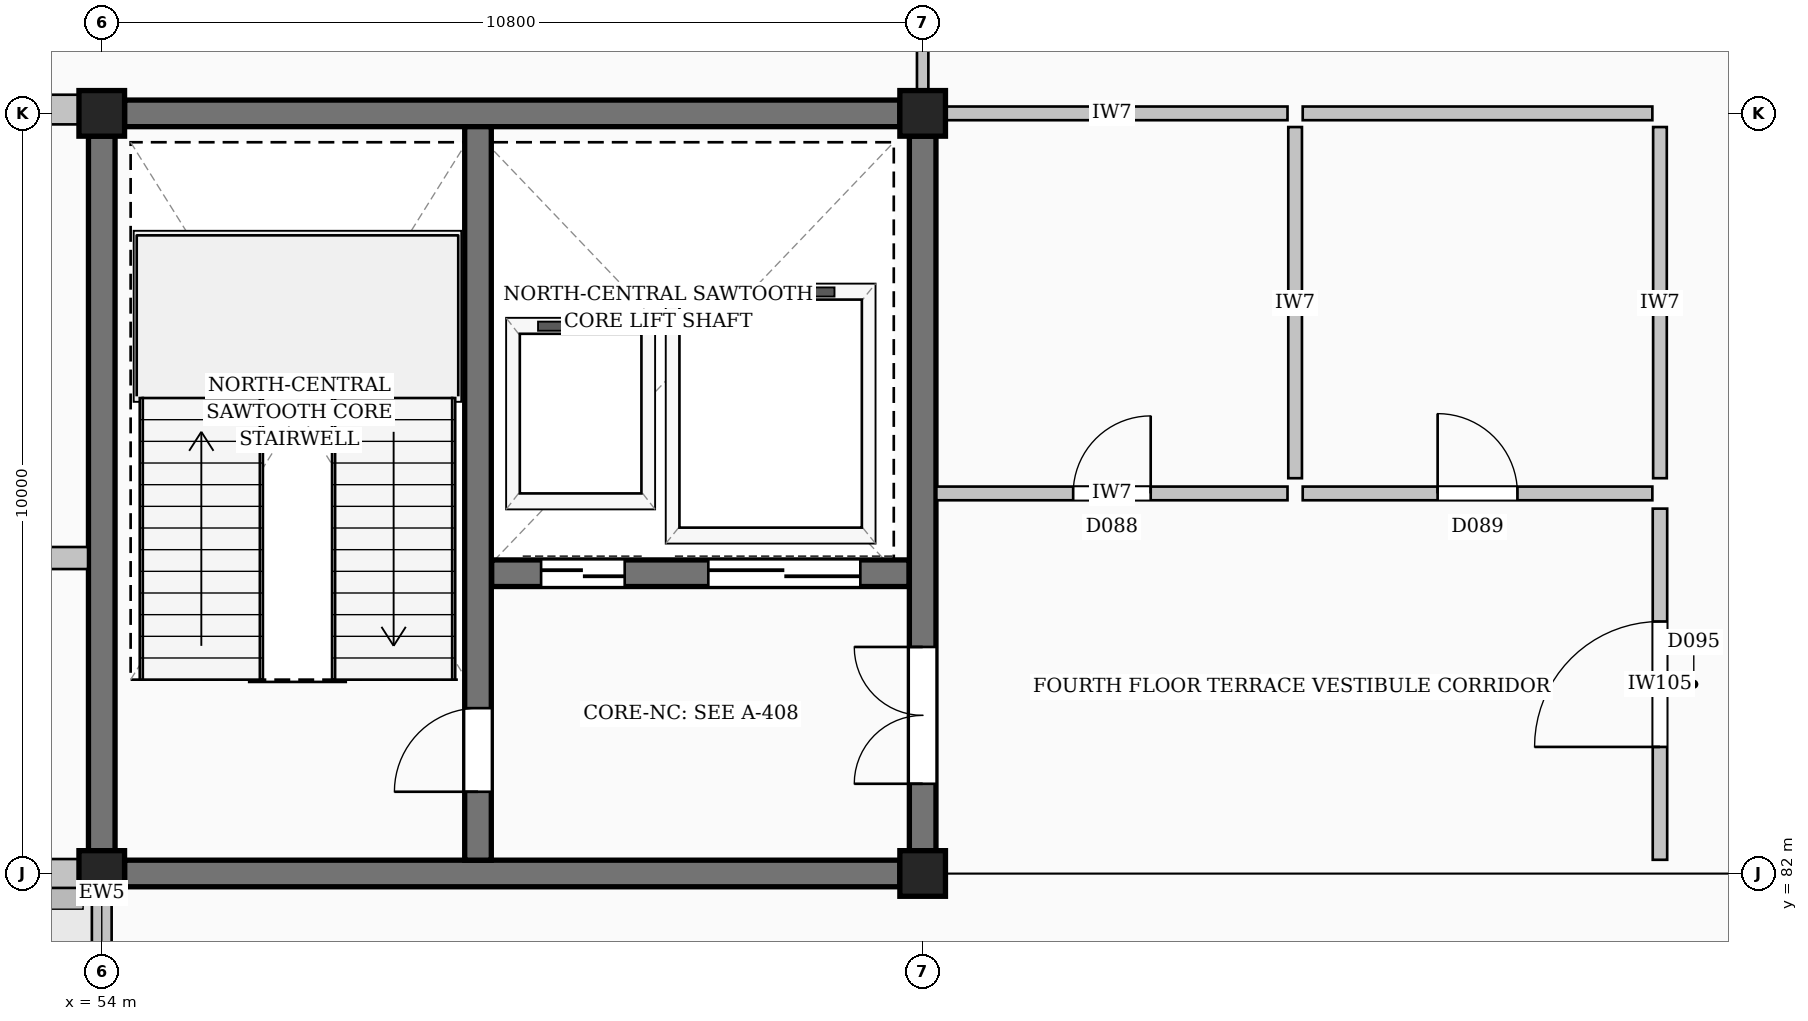
"""IFC4 building model, lengths in metres.
Left out: names, types, materials, properties, quantities, classifications, styles, units other than length and angle.
Written with IfcOpenShell. Run it as: python <this file> out.ifc"""

import sys

from ifc_helpers import new_model, si_unit, direction, frame, frame_2d, origin, origin_2d, place, context, subcontext, project, spatial, rectangle, extrude, element, fill, save


model = new_model("IFC4")
c1 = context("Model", 3, precision=1e-05, world=origin(), true_north=direction((0.0, 1.0)))
c2 = subcontext(c1, "Body", "Model", "MODEL_VIEW")
j1 = project(units=[si_unit("LENGTHUNIT", "METRE"), si_unit("PLANEANGLEUNIT", "RADIAN")], contexts=[c1])
p1 = place(None, origin())
s1 = spatial("IfcSite", under=j1, at=p1, CompositionType="ELEMENT")
p2 = place(p1, origin())
s2 = spatial("IfcBuilding", under=s1, at=p2, CompositionType="ELEMENT")
p3 = place(p2, frame((0.0, 0.0, 24.0)))
s3 = spatial("IfcBuildingStorey", under=s2, at=p3, CompositionType="ELEMENT", Elevation=24.0)
for number, where, z_axis, x_axis in (
    (1, (54.0, 82.0, 0.0), (0.0, 0.0, 1.0), (1.0, 0.0, 0.0)),
    (2, (54.0, 92.0, 0.0), (0.0, 0.0, 1.0), (1.0, 0.0, 0.0)),
    (3, (64.8, 82.0, 0.0), (0.0, 0.0, 1.0), (1.0, 0.0, 0.0)),
    (4, (64.8, 92.0, 0.0), (0.0, 0.0, 1.0), (1.0, 0.0, 0.0)),
):
    element("IfcColumn", number, at=place(p3, frame(where, z_axis=z_axis, x_axis=x_axis)), inside=s3, PredefinedType="COLUMN", context=c2, shape_type="SweptSolid", body=[
        extrude(rectangle(XDim=0.6, YDim=0.6, at=origin_2d()), origin(), (0.0, 0.0, 1.0), 4.8),
    ])
p4 = place(p3, frame((43.345, 82.0, 0.0), z_axis=(0.0, 0.0, 1.0), x_axis=(1.0, 0.0, 0.0)))
e5 = element("IfcWall", 5, at=p4, inside=s3, PredefinedType="STANDARD", context=c2, shape_type="SweptSolid", body=[
    extrude(rectangle(XDim=10.51, YDim=0.38, at=frame_2d((5.255, 0.0))), origin(), (0.0, 0.0, 1.0), 4.17),
])
p5 = place(p4, frame((3.655, 0.0, 1.0)))
e6 = element("IfcOpeningElement", 6, at=p5, cuts=e5, PredefinedType="OPENING", context=c2, shape_type="SweptSolid", body=[
    extrude(rectangle(XDim=3.2, YDim=2.5, at=frame_2d((1.6, 1.25))), frame((0.0, 0.2, 0.0), z_axis=(0.0, -1.0, 0.0), x_axis=(1.0, 0.0, 0.0)), (0.0, 0.0, 1.0), 0.4),
])
p6 = place(p3, frame((54.0, 81.855, 0.0), z_axis=(0.0, 0.0, 1.0), x_axis=(0.0, -1.0, 0.0)))
e7 = element("IfcWall", 7, at=p6, inside=s3, PredefinedType="STANDARD", context=c2, shape_type="SweptSolid", body=[
    extrude(rectangle(XDim=0.225, YDim=0.3, at=frame_2d((0.113, 0.0))), origin(), (0.0, 0.0, 1.0), 4.56),
])
p7 = place(p3, frame((54.0, 40.35, 4.6), z_axis=(0.0, 0.0, 1.0), x_axis=(0.0, 1.0, 0.0)))
e8 = element("IfcWall", 8, at=p7, inside=s3, PredefinedType="PARAPET", context=c2, shape_type="SweptSolid", body=[
    extrude(rectangle(XDim=41.3, YDim=0.26, at=frame_2d((20.65, 0.0))), origin(), (0.0, 0.0, 1.0), 0.55),
])
for number, where, z_axis, x_axis in (
    (9, (54.3, 82.0, 0.0), (0.0, 0.0, 1.0), (1.0, 0.0, 0.0)),
    (10, (54.3, 92.0, 0.0), (0.0, 0.0, 1.0), (1.0, 0.0, 0.0)),
):
    element("IfcWall", number, at=place(p3, frame(where, z_axis=z_axis, x_axis=x_axis)), inside=s3, PredefinedType="SHEAR", context=c2, shape_type="SweptSolid", body=[
        extrude(rectangle(XDim=10.2, YDim=0.35, at=frame_2d((5.1, 0.0))), origin(), (0.0, 0.0, 1.0), 4.56),
    ])
p8 = place(p3, frame((54.0, 82.3, 0.0), z_axis=(0.0, 0.0, 1.0), x_axis=(0.0, 1.0, 0.0)))
e11 = element("IfcWall", 11, at=p8, inside=s3, PredefinedType="SHEAR", context=c2, shape_type="SweptSolid", body=[
    extrude(rectangle(XDim=9.4, YDim=0.35, at=frame_2d((4.7, 0.0))), origin(), (0.0, 0.0, 1.0), 4.56),
])
p9 = place(p3, frame((64.8, 82.3, 0.0), z_axis=(0.0, 0.0, 1.0), x_axis=(0.0, 1.0, 0.0)))
e12 = element("IfcWall", 12, at=p9, inside=s3, PredefinedType="SHEAR", context=c2, shape_type="SweptSolid", body=[
    extrude(rectangle(XDim=9.4, YDim=0.35, at=frame_2d((4.7, 0.0))), origin(), (0.0, 0.0, 1.0), 4.56),
])
p10 = place(p9, frame((0.88, 0.0, 0.0)))
e13 = element("IfcOpeningElement", 13, at=p10, cuts=e12, PredefinedType="OPENING", context=c2, shape_type="SweptSolid", body=[
    extrude(rectangle(XDim=1.8, YDim=2.25, at=frame_2d((0.9, 1.125))), frame((0.0, 0.185, 0.0), z_axis=(0.0, -1.0, 0.0), x_axis=(1.0, 0.0, 0.0)), (0.0, 0.0, 1.0), 0.37),
])
p11 = place(p3, frame((58.95, 82.175, 0.0), z_axis=(0.0, 0.0, 1.0), x_axis=(0.0, 1.0, 0.0)))
e14 = element("IfcWall", 14, at=p11, inside=s3, PredefinedType="SHEAR", context=c2, shape_type="SweptSolid", body=[
    extrude(rectangle(XDim=9.65, YDim=0.35, at=frame_2d((4.825, 0.0))), origin(), (0.0, 0.0, 1.0), 4.56),
])
p12 = place(p11, frame((0.9, 0.0, 0.0)))
e15 = element("IfcOpeningElement", 15, at=p12, cuts=e14, PredefinedType="OPENING", context=c2, shape_type="SweptSolid", body=[
    extrude(rectangle(XDim=1.1, YDim=2.2, at=frame_2d((0.55, 1.1))), frame((0.0, 0.185, 0.0), z_axis=(0.0, -1.0, 0.0), x_axis=(1.0, 0.0, 0.0)), (0.0, 0.0, 1.0), 0.37),
])
p13 = place(p3, frame((59.13, 85.95, 0.0), z_axis=(0.0, 0.0, 1.0), x_axis=(1.0, 0.0, 0.0)))
e16 = element("IfcWall", 16, at=p13, inside=s3, PredefinedType="SHEAR", context=c2, shape_type="SweptSolid", body=[
    extrude(rectangle(XDim=5.49, YDim=0.35, at=frame_2d((2.745, 0.0))), origin(), (0.0, 0.0, 1.0), 4.56),
])
p14 = place(p13, frame((0.65, 0.0, 0.0)))
e17 = element("IfcOpeningElement", 17, at=p14, cuts=e16, PredefinedType="OPENING", context=c2, shape_type="SweptSolid", body=[
    extrude(rectangle(XDim=1.1, YDim=2.2, at=frame_2d((0.55, 1.1))), frame((0.0, 0.185, 0.0), z_axis=(0.0, -1.0, 0.0), x_axis=(1.0, 0.0, 0.0)), (0.0, 0.0, 1.0), 0.37),
])
p15 = place(p13, frame((2.85, 0.0, 0.0)))
e18 = element("IfcOpeningElement", 18, at=p15, cuts=e16, PredefinedType="OPENING", context=c2, shape_type="SweptSolid", body=[
    extrude(rectangle(XDim=2.0, YDim=2.5, at=frame_2d((1.0, 1.25))), frame((0.0, 0.185, 0.0), z_axis=(0.0, -1.0, 0.0), x_axis=(1.0, 0.0, 0.0)), (0.0, 0.0, 1.0), 0.37),
])
p16 = place(p3, frame((25.6, 86.15, 0.0), z_axis=(0.0, 0.0, 1.0), x_axis=(1.0, 0.0, 0.0)))
e19 = element("IfcWall", 19, at=p16, inside=s3, PredefinedType="PARTITIONING", context=c2, shape_type="SweptSolid", body=[
    extrude(rectangle(XDim=28.22, YDim=0.29, at=frame_2d((14.11, 0.0))), origin(), (0.0, 0.0, 1.0), 4.52),
])
p17 = place(p16, frame((13.59, 0.0, 0.0)))
e20 = element("IfcOpeningElement", 20, at=p17, cuts=e19, PredefinedType="OPENING", context=c2, shape_type="SweptSolid", body=[
    extrude(rectangle(XDim=1.04, YDim=2.2, at=frame_2d((0.52, 1.1))), frame((0.0, 0.155, 0.0), z_axis=(0.0, -1.0, 0.0), x_axis=(1.0, 0.0, 0.0)), (0.0, 0.0, 1.0), 0.31),
])
p18 = place(p3, frame((64.98, 87.0, 0.0), z_axis=(0.0, 0.0, 1.0), x_axis=(1.0, 0.0, 0.0)))
e21 = element("IfcWall", 21, at=p18, inside=s3, PredefinedType="PLUMBINGWALL", context=c2, shape_type="SweptSolid", body=[
    extrude(rectangle(XDim=4.62, YDim=0.18, at=frame_2d((2.31, 0.0))), origin(), (0.0, 0.0, 1.0), 4.52),
])
p19 = place(p18, frame((1.8, 0.0, 0.0)))
e22 = element("IfcOpeningElement", 22, at=p19, cuts=e21, PredefinedType="OPENING", context=c2, shape_type="SweptSolid", body=[
    extrude(rectangle(XDim=1.02, YDim=2.2, at=frame_2d((0.51, 1.1))), frame((0.0, 0.1, 0.0), z_axis=(0.0, -1.0, 0.0), x_axis=(1.0, 0.0, 0.0)), (0.0, 0.0, 1.0), 0.2),
])
p20 = place(p3, frame((69.8, 87.0, 0.0), z_axis=(0.0, 0.0, 1.0), x_axis=(1.0, 0.0, 0.0)))
e23 = element("IfcWall", 23, at=p20, inside=s3, PredefinedType="PLUMBINGWALL", context=c2, shape_type="SweptSolid", body=[
    extrude(rectangle(XDim=4.6, YDim=0.18, at=frame_2d((2.3, 0.0))), origin(), (0.0, 0.0, 1.0), 4.52),
])
p21 = place(p20, frame((1.775, 0.0, 0.0)))
e24 = element("IfcOpeningElement", 24, at=p21, cuts=e23, PredefinedType="OPENING", context=c2, shape_type="SweptSolid", body=[
    extrude(rectangle(XDim=1.05, YDim=2.15, at=frame_2d((0.525, 1.075))), frame((0.0, 0.1, 0.0), z_axis=(0.0, -1.0, 0.0), x_axis=(1.0, 0.0, 0.0)), (0.0, 0.0, 1.0), 0.2),
])
p22 = place(p3, frame((43.4, 92.05, 0.0), z_axis=(0.0, 0.0, 1.0), x_axis=(1.0, 0.0, 0.0)))
e25 = element("IfcWall", 25, at=p22, inside=s3, PredefinedType="PARTITIONING", context=c2, shape_type="SweptSolid", body=[
    extrude(rectangle(XDim=10.42, YDim=0.39, at=frame_2d((5.21, 0.0))), origin(), (0.0, 0.0, 1.0), 4.17),
])
p23 = place(p22, frame((4.585, 0.0, 0.0)))
e26 = element("IfcOpeningElement", 26, at=p23, cuts=e25, PredefinedType="OPENING", context=c2, shape_type="SweptSolid", body=[
    extrude(rectangle(XDim=1.25, YDim=2.3, at=frame_2d((0.625, 1.15))), frame((0.0, 0.205, 0.0), z_axis=(0.0, -1.0, 0.0), x_axis=(1.0, 0.0, 0.0)), (0.0, 0.0, 1.0), 0.41),
])
p24 = place(p3, frame((64.8, 92.18, 0.0), z_axis=(0.0, 0.0, 1.0), x_axis=(0.0, 1.0, 0.0)))
e27 = element("IfcWall", 27, at=p24, inside=s3, PredefinedType="PARTITIONING", context=c2, shape_type="SweptSolid", body=[
    extrude(rectangle(XDim=9.62, YDim=0.15, at=frame_2d((4.81, 0.0))), origin(), (0.0, 0.0, 1.0), 4.06),
])
p25 = place(p3, frame((74.5, 82.18, 0.0), z_axis=(0.0, 0.0, 1.0), x_axis=(0.0, 1.0, 0.0)))
e28 = element("IfcWall", 28, at=p25, inside=s3, PredefinedType="PARTITIONING", context=c2, shape_type="SweptSolid", body=[
    extrude(rectangle(XDim=4.62, YDim=0.19, at=frame_2d((2.31, 0.0))), origin(), (0.0, 0.0, 1.0), 4.52),
])
p26 = place(p25, frame((1.485, 0.0, 0.0)))
e29 = element("IfcOpeningElement", 29, at=p26, cuts=e28, PredefinedType="OPENING", context=c2, shape_type="SweptSolid", body=[
    extrude(rectangle(XDim=1.65, YDim=2.4, at=frame_2d((0.825, 1.2))), frame((0.0, 0.105, 0.0), z_axis=(0.0, -1.0, 0.0), x_axis=(1.0, 0.0, 0.0)), (0.0, 0.0, 1.0), 0.21),
])
p27 = place(p3, frame((64.98, 92.0, 0.0), z_axis=(0.0, 0.0, 1.0), x_axis=(1.0, 0.0, 0.0)))
e30 = element("IfcWall", 30, at=p27, inside=s3, PredefinedType="PLUMBINGWALL", context=c2, shape_type="SweptSolid", body=[
    extrude(rectangle(XDim=4.62, YDim=0.18, at=frame_2d((2.31, 0.0))), origin(), (0.0, 0.0, 1.0), 4.17),
])
p28 = place(p3, frame((69.8, 92.0, 0.0), z_axis=(0.0, 0.0, 1.0), x_axis=(1.0, 0.0, 0.0)))
e31 = element("IfcWall", 31, at=p28, inside=s3, PredefinedType="PLUMBINGWALL", context=c2, shape_type="SweptSolid", body=[
    extrude(rectangle(XDim=4.6, YDim=0.18, at=frame_2d((2.3, 0.0))), origin(), (0.0, 0.0, 1.0), 4.17),
])
for number, where, z_axis, x_axis in (
    (32, (69.7, 87.2, 0.0), (0.0, 0.0, 1.0), (0.0, 1.0, 0.0)),
    (33, (74.5, 87.2, 0.0), (0.0, 0.0, 1.0), (0.0, 1.0, 0.0)),
):
    element("IfcWall", number, at=place(p3, frame(where, z_axis=z_axis, x_axis=x_axis)), inside=s3, PredefinedType="PLUMBINGWALL", context=c2, shape_type="SweptSolid", body=[
        extrude(rectangle(XDim=4.62, YDim=0.18, at=frame_2d((2.31, 0.0))), origin(), (0.0, 0.0, 1.0), 4.52),
    ])
p29 = place(p12, origin())
e34 = element("IfcDoor", 34, at=p29, inside=s3, OperationType="SINGLE_SWING_LEFT", PredefinedType="DOOR", context=c2, shape_type="SweptSolid", body=[
    extrude(rectangle(XDim=1.1, YDim=2.2, at=frame_2d((0.55, 1.1))), frame((0.0, 0.025, 0.0), z_axis=(0.0, -1.0, 0.0), x_axis=(1.0, 0.0, 0.0)), (0.0, 0.0, 1.0), 0.05),
])
fill(e15, e34)
p30 = place(p10, origin())
e35 = element("IfcDoor", 35, at=p30, inside=s3, OperationType="DOUBLE_DOOR_SINGLE_SWING", PredefinedType="DOOR", context=c2, shape_type="SweptSolid", body=[
    extrude(rectangle(XDim=1.8, YDim=2.25, at=frame_2d((0.9, 1.125))), frame((0.0, 0.025, 0.0), z_axis=(0.0, -1.0, 0.0), x_axis=(1.0, 0.0, 0.0)), (0.0, 0.0, 1.0), 0.05),
])
fill(e13, e35)
p31 = place(p14, origin())
e36 = element("IfcDoor", 36, at=p31, inside=s3, OperationType="DOUBLE_DOOR_SLIDING", PredefinedType="DOOR", context=c2, shape_type="SweptSolid", body=[
    extrude(rectangle(XDim=1.1, YDim=2.2, at=frame_2d((0.55, 1.1))), frame((0.0, 0.025, 0.0), z_axis=(0.0, -1.0, 0.0), x_axis=(1.0, 0.0, 0.0)), (0.0, 0.0, 1.0), 0.05),
])
fill(e17, e36)
p32 = place(p15, origin())
e37 = element("IfcDoor", 37, at=p32, inside=s3, OperationType="DOUBLE_DOOR_SLIDING", PredefinedType="DOOR", context=c2, shape_type="SweptSolid", body=[
    extrude(rectangle(XDim=2.0, YDim=2.5, at=frame_2d((1.0, 1.25))), frame((0.0, 0.025, 0.0), z_axis=(0.0, -1.0, 0.0), x_axis=(1.0, 0.0, 0.0)), (0.0, 0.0, 1.0), 0.05),
])
fill(e18, e37)
p33 = place(p19, origin())
e38 = element("IfcDoor", 38, at=p33, inside=s3, OperationType="SINGLE_SWING_RIGHT", PredefinedType="DOOR", context=c2, shape_type="SweptSolid", body=[
    extrude(rectangle(XDim=1.02, YDim=2.2, at=frame_2d((0.51, 1.1))), frame((0.0, 0.025, 0.0), z_axis=(0.0, -1.0, 0.0), x_axis=(1.0, 0.0, 0.0)), (0.0, 0.0, 1.0), 0.05),
])
fill(e22, e38)
p34 = place(p21, origin())
e39 = element("IfcDoor", 39, at=p34, inside=s3, OperationType="SINGLE_SWING_LEFT", PredefinedType="DOOR", context=c2, shape_type="SweptSolid", body=[
    extrude(rectangle(XDim=1.05, YDim=2.15, at=frame_2d((0.525, 1.075))), frame((0.0, 0.025, 0.0), z_axis=(0.0, -1.0, 0.0), x_axis=(1.0, 0.0, 0.0)), (0.0, 0.0, 1.0), 0.05),
])
fill(e24, e39)
p35 = place(p26, origin())
e40 = element("IfcDoor", 40, at=p35, inside=s3, OperationType="SINGLE_SWING_LEFT", PredefinedType="DOOR", context=c2, shape_type="SweptSolid", body=[
    extrude(rectangle(XDim=1.65, YDim=2.4, at=frame_2d((0.825, 1.2))), frame((0.0, 0.025, 0.0), z_axis=(0.0, -1.0, 0.0), x_axis=(1.0, 0.0, 0.0)), (0.0, 0.0, 1.0), 0.05),
])
fill(e29, e40)
save(model, sys.argv[1])
